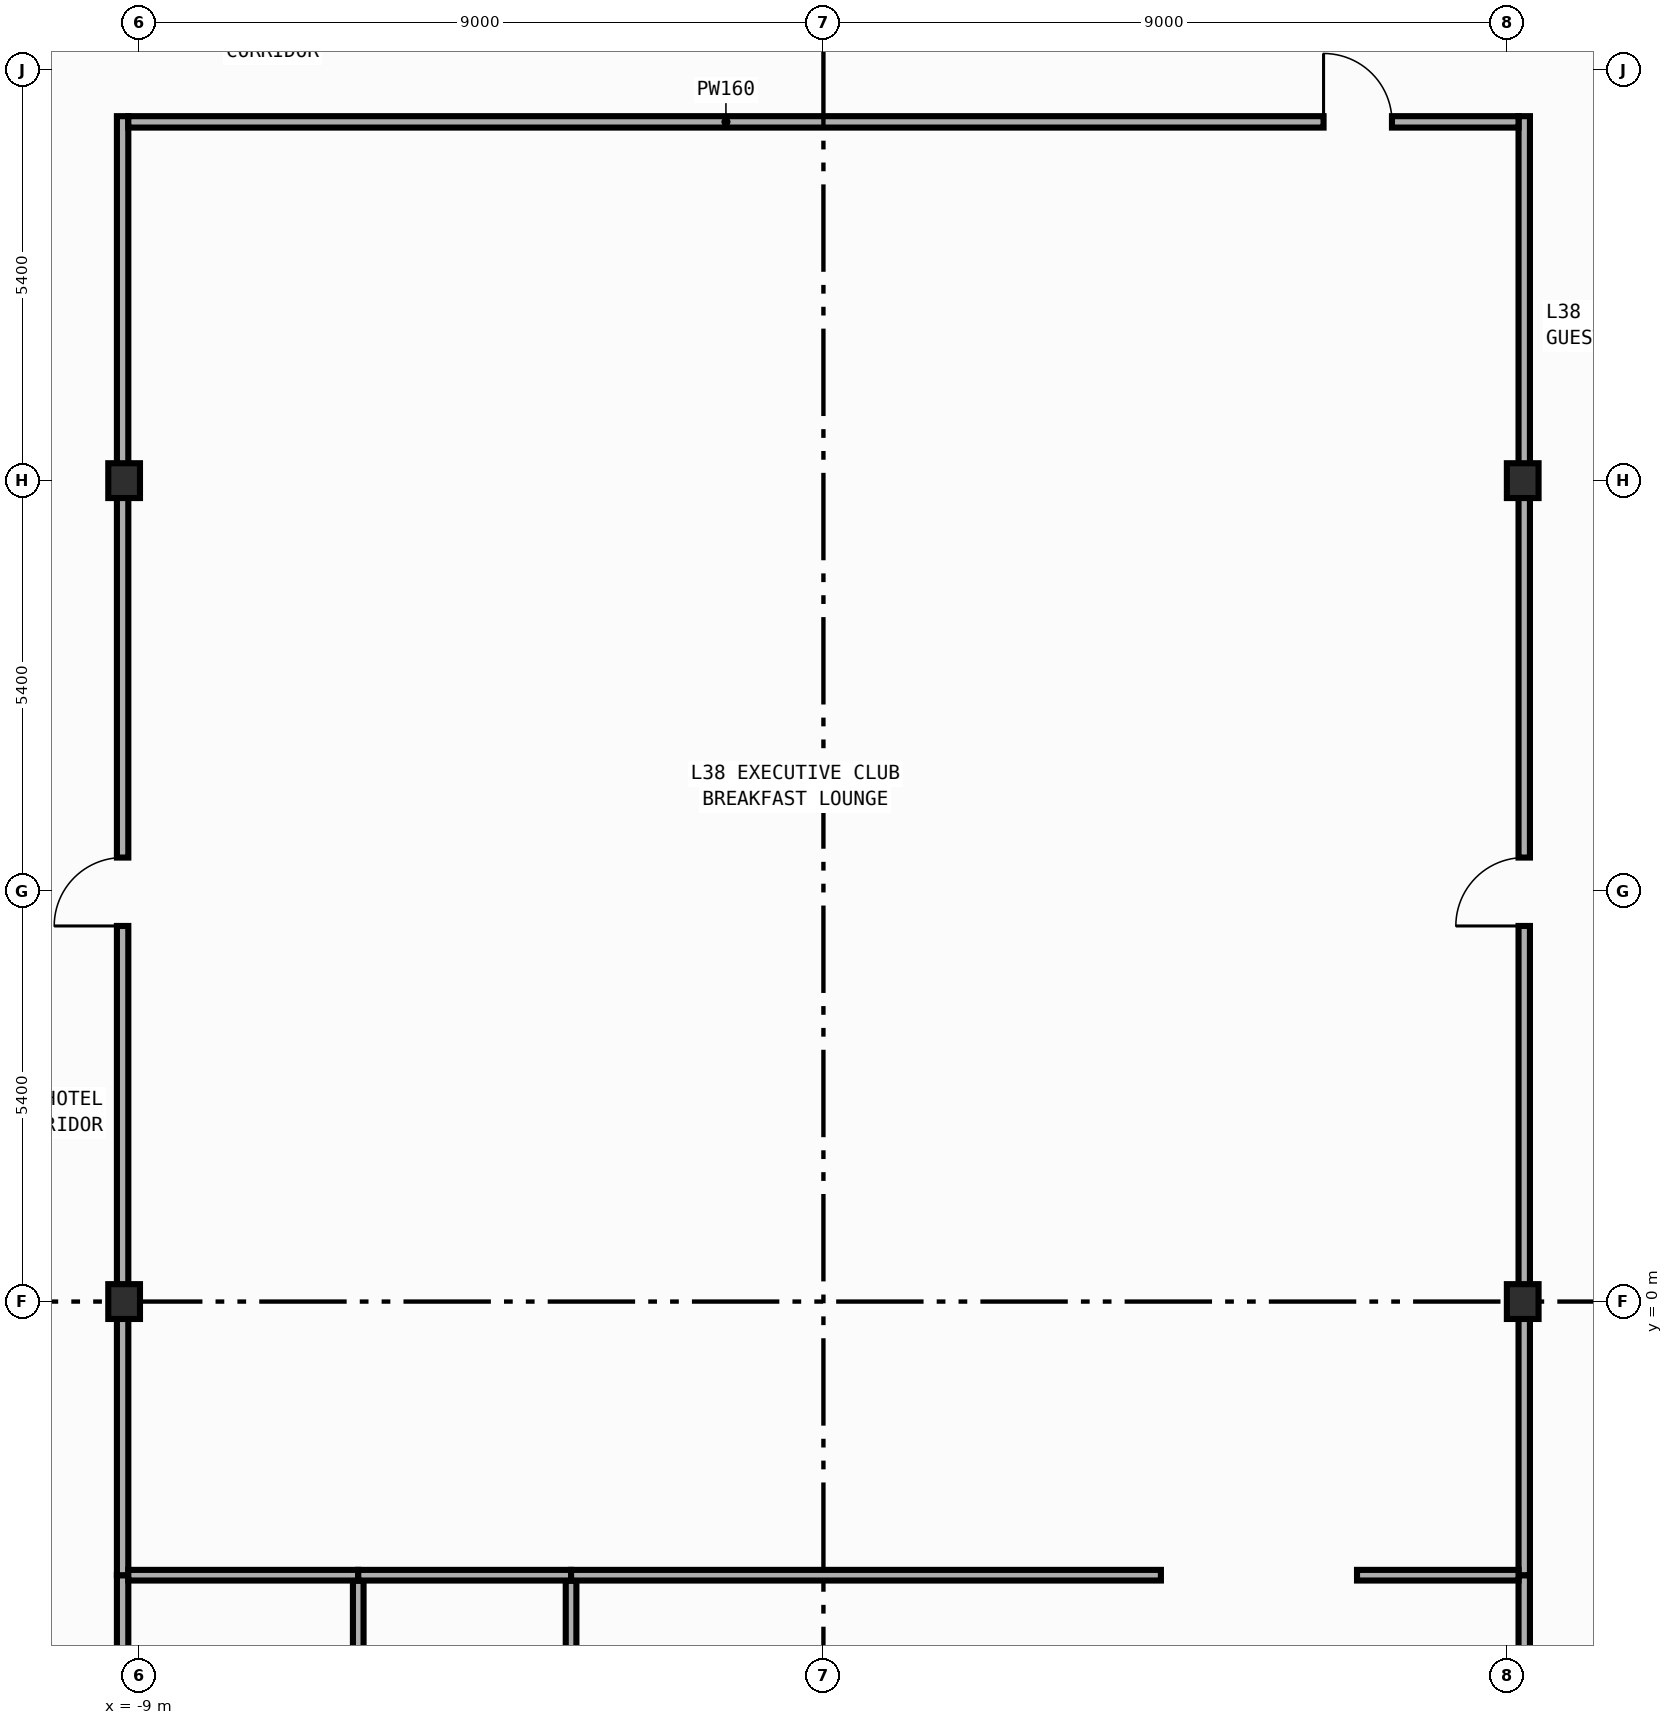
"""IFC4 building model, lengths in metres.
Left out: names, types, materials, properties, quantities, classifications, styles, units other than length and angle.
Written with IfcOpenShell. Run it as: python <this file> out.ifc"""

import sys

from ifc_helpers import new_model, si_unit, direction, frame, frame_2d, origin, origin_2d, place, context, subcontext, project, spatial, rectangle, i_section, extrude, element, fill, save


model = new_model("IFC4")
c1 = context("Model", 3, precision=1e-05, world=origin(), true_north=direction((0.0, 1.0)))
c2 = subcontext(c1, "Body", "Model", "MODEL_VIEW")
j1 = project(units=[si_unit("LENGTHUNIT", "METRE"), si_unit("PLANEANGLEUNIT", "RADIAN")], contexts=[c1])
p1 = place(None, origin())
s1 = spatial("IfcSite", under=j1, at=p1, CompositionType="ELEMENT")
p2 = place(p1, origin())
s2 = spatial("IfcBuilding", under=s1, at=p2, CompositionType="ELEMENT")
p3 = place(p2, frame((0.0, 0.0, 168.8)))
s3 = spatial("IfcBuildingStorey", under=s2, at=p3, CompositionType="ELEMENT", Elevation=168.8)
for number, where, z_axis, x_axis in (
    (1, (-9.2, 0.0, 0.0), (0.0, 0.0, 1.0), (1.0, 0.0, 0.0)),
    (2, (-9.2, 10.8, 0.0), (0.0, 0.0, 1.0), (1.0, 0.0, 0.0)),
    (3, (9.2, 0.0, 0.0), (0.0, 0.0, 1.0), (1.0, 0.0, 0.0)),
    (4, (9.2, 10.8, 0.0), (0.0, 0.0, 1.0), (1.0, 0.0, 0.0)),
):
    element("IfcColumn", number, at=place(p3, frame(where, z_axis=z_axis, x_axis=x_axis)), inside=s3, PredefinedType="COLUMN", context=c2, shape_type="SweptSolid", body=[
        extrude(i_section(OverallWidth=0.417, OverallDepth=0.458, WebThickness=0.03, FlangeThickness=0.05, FilletRadius=0.022, at=origin_2d()), origin(), (0.0, 0.0, 1.0), 3.8),
    ])
p4 = place(p3, frame((-9.22, -14.195, 0.0), z_axis=(0.0, 0.0, 1.0), x_axis=(0.0, 1.0, 0.0)))
e5 = element("IfcWall", 5, at=p4, inside=s3, PredefinedType="PARTITIONING", context=c2, shape_type="SweptSolid", body=[
    extrude(rectangle(XDim=10.595, YDim=0.15, at=frame_2d((5.297, 0.0))), origin(), (0.0, 0.0, 1.0), 2.952),
])
p5 = place(p4, frame((8.419, 0.0, 0.0)))
e6 = element("IfcOpeningElement", 6, at=p5, cuts=e5, PredefinedType="OPENING", context=c2, shape_type="SweptSolid", body=[
    extrude(rectangle(XDim=0.9, YDim=2.15, at=frame_2d((0.45, 1.075))), frame((0.0, 0.085, 0.0), z_axis=(0.0, -1.0, 0.0), x_axis=(1.0, 0.0, 0.0)), (0.0, 0.0, 1.0), 0.17),
])
p6 = place(p3, frame((-9.22, -3.6, 0.0), z_axis=(0.0, 0.0, 1.0), x_axis=(0.0, 1.0, 0.0)))
e7 = element("IfcWall", 7, at=p6, inside=s3, PredefinedType="PARTITIONING", context=c2, shape_type="SweptSolid", body=[
    extrude(rectangle(XDim=19.195, YDim=0.15, at=frame_2d((9.598, 0.0))), origin(), (0.0, 0.0, 1.0), 2.952),
])
p7 = place(p6, frame((8.542, 0.0, 0.0)))
e8 = element("IfcOpeningElement", 8, at=p7, cuts=e7, PredefinedType="OPENING", context=c2, shape_type="SweptSolid", body=[
    extrude(rectangle(XDim=0.9, YDim=2.15, at=frame_2d((0.45, 1.075))), frame((0.0, 0.085, 0.0), z_axis=(0.0, -1.0, 0.0), x_axis=(1.0, 0.0, 0.0)), (0.0, 0.0, 1.0), 0.17),
])
p8 = place(p3, frame((9.22, -14.195, 0.0), z_axis=(0.0, 0.0, 1.0), x_axis=(0.0, 1.0, 0.0)))
e9 = element("IfcWall", 9, at=p8, inside=s3, PredefinedType="PARTITIONING", context=c2, shape_type="SweptSolid", body=[
    extrude(rectangle(XDim=10.595, YDim=0.15, at=frame_2d((5.297, 0.0))), origin(), (0.0, 0.0, 1.0), 2.952),
])
p9 = place(p8, frame((8.419, 0.0, 0.0)))
e10 = element("IfcOpeningElement", 10, at=p9, cuts=e9, PredefinedType="OPENING", context=c2, shape_type="SweptSolid", body=[
    extrude(rectangle(XDim=0.9, YDim=2.15, at=frame_2d((0.45, 1.075))), frame((0.0, 0.085, 0.0), z_axis=(0.0, -1.0, 0.0), x_axis=(1.0, 0.0, 0.0)), (0.0, 0.0, 1.0), 0.17),
])
p10 = place(p3, frame((9.22, -3.6, 0.0), z_axis=(0.0, 0.0, 1.0), x_axis=(0.0, 1.0, 0.0)))
e11 = element("IfcWall", 11, at=p10, inside=s3, PredefinedType="PARTITIONING", context=c2, shape_type="SweptSolid", body=[
    extrude(rectangle(XDim=19.195, YDim=0.15, at=frame_2d((9.598, 0.0))), origin(), (0.0, 0.0, 1.0), 2.952),
])
p11 = place(p10, frame((8.542, 0.0, 0.0)))
e12 = element("IfcOpeningElement", 12, at=p11, cuts=e11, PredefinedType="OPENING", context=c2, shape_type="SweptSolid", body=[
    extrude(rectangle(XDim=0.9, YDim=2.15, at=frame_2d((0.45, 1.075))), frame((0.0, 0.085, 0.0), z_axis=(0.0, -1.0, 0.0), x_axis=(1.0, 0.0, 0.0)), (0.0, 0.0, 1.0), 0.17),
])
p12 = place(p3, frame((-9.145, 15.52, 0.0), z_axis=(0.0, 0.0, 1.0), x_axis=(1.0, 0.0, 0.0)))
e13 = element("IfcWall", 13, at=p12, inside=s3, PredefinedType="PARTITIONING", context=c2, shape_type="SweptSolid", body=[
    extrude(rectangle(XDim=18.29, YDim=0.15, at=frame_2d((9.145, 0.0))), origin(), (0.0, 0.0, 1.0), 3.54),
])
p13 = place(p12, frame((15.725, 0.0, 0.0)))
e14 = element("IfcOpeningElement", 14, at=p13, cuts=e13, PredefinedType="OPENING", context=c2, shape_type="SweptSolid", body=[
    extrude(rectangle(XDim=0.9, YDim=2.15, at=frame_2d((0.45, 1.075))), frame((0.0, 0.085, 0.0), z_axis=(0.0, -1.0, 0.0), x_axis=(1.0, 0.0, 0.0)), (0.0, 0.0, 1.0), 0.17),
])
p14 = place(p3, frame((-6.12, -14.045, 0.0), z_axis=(0.0, 0.0, 1.0), x_axis=(0.0, 1.0, 0.0)))
e15 = element("IfcWall", 15, at=p14, inside=s3, PredefinedType="PARTITIONING", context=c2, shape_type="SweptSolid", body=[
    extrude(rectangle(XDim=10.375, YDim=0.14, at=frame_2d((5.188, 0.0))), origin(), (0.0, 0.0, 1.0), 3.54),
])
p15 = place(p3, frame((-9.145, -3.6, 0.0), z_axis=(0.0, 0.0, 1.0), x_axis=(1.0, 0.0, 0.0)))
e16 = element("IfcWall", 16, at=p15, inside=s3, PredefinedType="PARTITIONING", context=c2, shape_type="SweptSolid", body=[
    extrude(rectangle(XDim=3.025, YDim=0.14, at=frame_2d((1.512, 0.0))), origin(), (0.0, 0.0, 1.0), 3.54),
])
p16 = place(p3, frame((-3.32, -14.045, 0.0), z_axis=(0.0, 0.0, 1.0), x_axis=(0.0, 1.0, 0.0)))
e17 = element("IfcWall", 17, at=p16, inside=s3, PredefinedType="PARTITIONING", context=c2, shape_type="SweptSolid", body=[
    extrude(rectangle(XDim=10.375, YDim=0.14, at=frame_2d((5.188, 0.0))), origin(), (0.0, 0.0, 1.0), 3.54),
])
p17 = place(p3, frame((-6.12, -3.6, 0.0), z_axis=(0.0, 0.0, 1.0), x_axis=(1.0, 0.0, 0.0)))
e18 = element("IfcWall", 18, at=p17, inside=s3, PredefinedType="PARTITIONING", context=c2, shape_type="SweptSolid", body=[
    extrude(rectangle(XDim=2.8, YDim=0.14, at=frame_2d((1.4, 0.0))), origin(), (0.0, 0.0, 1.0), 3.54),
])
p18 = place(p3, frame((-3.32, -3.6, 0.0), z_axis=(0.0, 0.0, 1.0), x_axis=(1.0, 0.0, 0.0)))
e19 = element("IfcWall", 19, at=p18, inside=s3, PredefinedType="PARTITIONING", context=c2, shape_type="SweptSolid", body=[
    extrude(rectangle(XDim=7.76, YDim=0.14, at=frame_2d((3.88, 0.0))), origin(), (0.0, 0.0, 1.0), 3.54),
])
p19 = place(p3, frame((7.02, -3.6, 0.0), z_axis=(0.0, 0.0, 1.0), x_axis=(1.0, 0.0, 0.0)))
e20 = element("IfcWall", 20, at=p19, inside=s3, PredefinedType="PARTITIONING", context=c2, shape_type="SweptSolid", body=[
    extrude(rectangle(XDim=2.125, YDim=0.14, at=frame_2d((1.062, 0.0))), origin(), (0.0, 0.0, 1.0), 3.54),
])
p20 = place(p7, origin())
e21 = element("IfcDoor", 21, at=p20, inside=s3, OperationType="SINGLE_SWING_LEFT", PredefinedType="DOOR", context=c2, shape_type="SweptSolid", body=[
    extrude(rectangle(XDim=0.9, YDim=2.15, at=frame_2d((0.45, 1.075))), frame((0.0, 0.025, 0.0), z_axis=(0.0, -1.0, 0.0), x_axis=(1.0, 0.0, 0.0)), (0.0, 0.0, 1.0), 0.05),
])
fill(e8, e21)
p21 = place(p11, origin())
e22 = element("IfcDoor", 22, at=p21, inside=s3, OperationType="SINGLE_SWING_LEFT", PredefinedType="DOOR", context=c2, shape_type="SweptSolid", body=[
    extrude(rectangle(XDim=0.9, YDim=2.15, at=frame_2d((0.45, 1.075))), frame((0.0, 0.025, 0.0), z_axis=(0.0, -1.0, 0.0), x_axis=(1.0, 0.0, 0.0)), (0.0, 0.0, 1.0), 0.05),
])
fill(e12, e22)
p22 = place(p13, origin())
e23 = element("IfcDoor", 23, at=p22, inside=s3, OperationType="SINGLE_SWING_LEFT", PredefinedType="DOOR", context=c2, shape_type="SweptSolid", body=[
    extrude(rectangle(XDim=0.9, YDim=2.15, at=frame_2d((0.45, 1.075))), frame((0.0, 0.025, 0.0), z_axis=(0.0, -1.0, 0.0), x_axis=(1.0, 0.0, 0.0)), (0.0, 0.0, 1.0), 0.05),
])
fill(e14, e23)
save(model, sys.argv[1])
